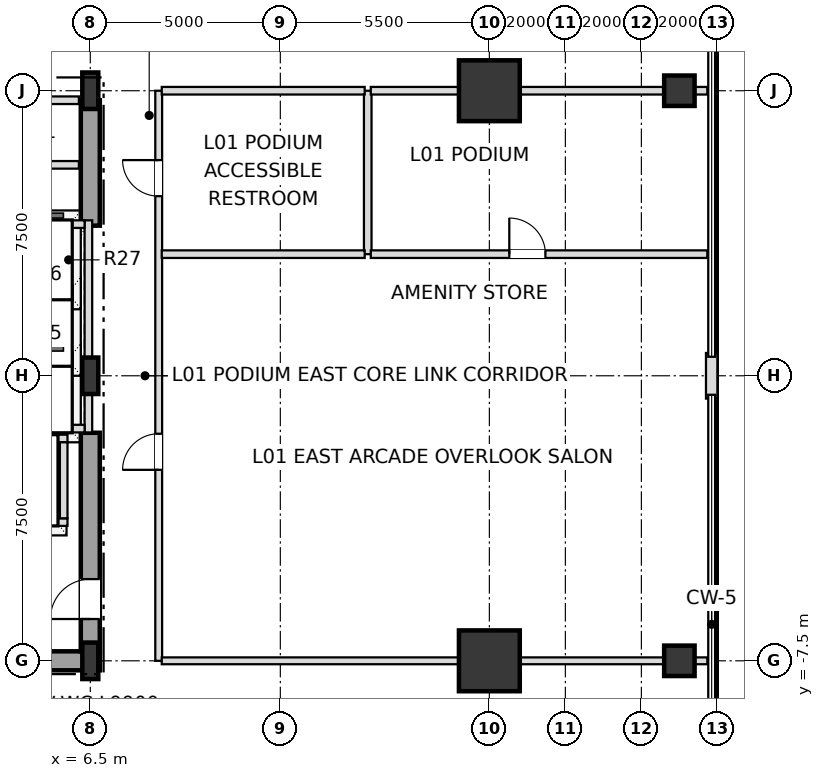
"""IFC4 building model, lengths in metres.
Left out: names, types, materials, properties, quantities, classifications, styles, units other than length and angle.
Written with IfcOpenShell. Run it as: python <this file> out.ifc"""

import sys

from ifc_helpers import new_model, si_unit, direction, frame, frame_2d, origin, origin_2d, place, context, subcontext, project, spatial, rectangle, i_section, extrude, element, fill, save


model = new_model("IFC4")
c1 = context("Model", 3, precision=1e-05, world=origin(), true_north=direction((0.0, 1.0)))
c2 = subcontext(c1, "Body", "Model", "MODEL_VIEW")
j1 = project(units=[si_unit("LENGTHUNIT", "METRE"), si_unit("PLANEANGLEUNIT", "RADIAN")], contexts=[c1])
p1 = place(None, origin())
s1 = spatial("IfcSite", under=j1, at=p1, CompositionType="ELEMENT")
p2 = place(p1, origin())
s2 = spatial("IfcBuilding", under=s1, at=p2, CompositionType="ELEMENT")
p3 = place(p2, frame((0.0, 0.0, 6.0)))
s3 = spatial("IfcBuildingStorey", under=s2, at=p3, CompositionType="ELEMENT", Elevation=6.0)
for number, where, z_axis, x_axis in (
    (1, (6.5, -7.5, 0.0), (0.0, 0.0, 1.0), (1.0, 0.0, 0.0)),
    (2, (6.5, 0.0, 0.0), (0.0, 0.0, 1.0), (1.0, 0.0, 0.0)),
    (3, (6.5, 7.5, 0.0), (0.0, 0.0, 1.0), (1.0, 0.0, 0.0)),
):
    element("IfcColumn", number, at=place(p3, frame(where, z_axis=z_axis, x_axis=x_axis)), inside=s3, PredefinedType="COLUMN", context=c2, shape_type="SweptSolid", body=[
        extrude(i_section(OverallWidth=0.42, OverallDepth=0.96, WebThickness=0.022, FlangeThickness=0.034, at=origin_2d()), origin(), (0.0, 0.0, 1.0), 5.4),
    ])
for number, where, z_axis, x_axis in (
    (4, (17.0, -7.5, 0.0), (0.0, 0.0, 1.0), (1.0, 0.0, 0.0)),
    (5, (17.0, 7.5, 0.0), (0.0, 0.0, 1.0), (1.0, 0.0, 0.0)),
):
    element("IfcColumn", number, at=place(p3, frame(where, z_axis=z_axis, x_axis=x_axis)), inside=s3, PredefinedType="USERDEFINED", context=c2, shape_type="SweptSolid", body=[
        extrude(rectangle(XDim=1.6, YDim=1.6, at=origin_2d()), origin(), (0.0, 0.0, 1.0), 5.4),
    ])
for number, where, z_axis, x_axis in (
    (6, (22.0, -7.5, 0.0), (0.0, 0.0, 1.0), (1.0, 0.0, 0.0)),
    (7, (22.0, 7.5, 0.0), (0.0, 0.0, 1.0), (1.0, 0.0, 0.0)),
):
    element("IfcColumn", number, at=place(p3, frame(where, z_axis=z_axis, x_axis=x_axis)), inside=s3, PredefinedType="COLUMN", context=c2, shape_type="SweptSolid", body=[
        extrude(rectangle(XDim=0.8, YDim=0.8, at=origin_2d()), origin(), (0.0, 0.0, 1.0), 5.4),
    ])
p4 = place(p3, frame((22.85, -0.6, 0.0), z_axis=(0.0, 0.0, 1.0), x_axis=(0.0, 1.0, 0.0)))
e8 = element("IfcWall", 8, at=p4, inside=s3, PredefinedType="SOLIDWALL", context=c2, shape_type="SweptSolid", body=[
    extrude(rectangle(XDim=1.2, YDim=0.3, at=frame_2d((0.6, 0.0))), origin(), (0.0, 0.0, 1.0), 4.476),
])
p5 = place(p3, frame((0.0, -7.5, 0.0), z_axis=(0.0, 0.0, 1.0), x_axis=(1.0, 0.0, 0.0)))
e9 = element("IfcWall", 9, at=p5, inside=s3, PredefinedType="SHEAR", context=c2, shape_type="SweptSolid", body=[
    extrude(rectangle(XDim=6.75, YDim=0.5, at=frame_2d((3.375, 0.0))), origin(), (0.0, 0.0, 1.0), 5.12),
])
p6 = place(p3, frame((6.5, -7.25, 0.0), z_axis=(0.0, 0.0, 1.0), x_axis=(0.0, 1.0, 0.0)))
e10 = element("IfcWall", 10, at=p6, inside=s3, PredefinedType="SHEAR", context=c2, shape_type="SweptSolid", body=[
    extrude(rectangle(XDim=5.75, YDim=0.5, at=frame_2d((2.875, 0.0))), origin(), (0.0, 0.0, 1.0), 5.12),
])
p7 = place(p6, frame((0.85, 0.0, 0.0)))
e11 = element("IfcOpeningElement", 11, at=p7, cuts=e10, PredefinedType="OPENING", context=c2, shape_type="SweptSolid", body=[
    extrude(rectangle(XDim=1.05, YDim=2.15, at=frame_2d((0.525, 1.075))), frame((0.0, 0.26, 0.0), z_axis=(0.0, -1.0, 0.0), x_axis=(1.0, 0.0, 0.0)), (0.0, 0.0, 1.0), 0.52),
])
p8 = place(p3, frame((6.5, 3.95, 0.0), z_axis=(0.0, 0.0, 1.0), x_axis=(0.0, 1.0, 0.0)))
e12 = element("IfcWall", 12, at=p8, inside=s3, PredefinedType="SHEAR", context=c2, shape_type="SweptSolid", body=[
    extrude(rectangle(XDim=3.3, YDim=0.5, at=frame_2d((1.65, 0.0))), origin(), (0.0, 0.0, 1.0), 5.12),
])
p9 = place(p3, frame((6.45, -1.49, 0.0), z_axis=(0.0, 0.0, 1.0), x_axis=(0.0, 1.0, 0.0)))
e13 = element("IfcWall", 13, at=p9, inside=s3, PredefinedType="SOLIDWALL", context=c2, shape_type="SweptSolid", body=[
    extrude(rectangle(XDim=5.58, YDim=0.2, at=frame_2d((2.79, 0.0))), origin(), (0.0, 0.0, 1.0), 4.41),
])
for number, where, z_axis, x_axis in (
    (14, (4.15, -1.39, 0.0), (0.0, 0.0, 1.0), (1.0, 0.0, 0.0)),
    (15, (4.15, 3.99, 0.0), (0.0, 0.0, 1.0), (1.0, 0.0, 0.0)),
):
    element("IfcWall", number, at=place(p3, frame(where, z_axis=z_axis, x_axis=x_axis)), inside=s3, PredefinedType="SOLIDWALL", context=c2, shape_type="SweptSolid", body=[
        extrude(rectangle(XDim=2.2, YDim=0.2, at=frame_2d((1.1, 0.0))), origin(), (0.0, 0.0, 1.0), 5.12),
    ])
p10 = place(p3, frame((1.8, -3.85, 0.0), z_axis=(0.0, 0.0, 1.0), x_axis=(1.0, 0.0, 0.0)))
e16 = element("IfcWall", 16, at=p10, inside=s3, PredefinedType="SOLIDWALL", context=c2, shape_type="SweptSolid", body=[
    extrude(rectangle(XDim=4.1, YDim=0.2, at=frame_2d((2.05, 0.0))), origin(), (0.0, 0.0, 1.0), 5.12),
])
p11 = place(p10, frame((0.45, 0.0, 0.0)))
e17 = element("IfcOpeningElement", 17, at=p11, cuts=e16, PredefinedType="OPENING", context=c2, shape_type="SweptSolid", body=[
    extrude(rectangle(XDim=1.2, YDim=2.2, at=frame_2d((0.6, 1.1))), frame((0.0, 0.11, 0.0), z_axis=(0.0, -1.0, 0.0), x_axis=(1.0, 0.0, 0.0)), (0.0, 0.0, 1.0), 0.22),
])
p12 = place(p10, frame((2.45, 0.0, 0.0)))
e18 = element("IfcOpeningElement", 18, at=p12, cuts=e16, PredefinedType="OPENING", context=c2, shape_type="SweptSolid", body=[
    extrude(rectangle(XDim=1.2, YDim=2.2, at=frame_2d((0.6, 1.1))), frame((0.0, 0.11, 0.0), z_axis=(0.0, -1.0, 0.0), x_axis=(1.0, 0.0, 0.0)), (0.0, 0.0, 1.0), 0.22),
])
p13 = place(p3, frame((1.8, -1.65, 0.0), z_axis=(0.0, 0.0, 1.0), x_axis=(1.0, 0.0, 0.0)))
e19 = element("IfcWall", 19, at=p13, inside=s3, PredefinedType="SOLIDWALL", context=c2, shape_type="SweptSolid", body=[
    extrude(rectangle(XDim=4.1, YDim=0.2, at=frame_2d((2.05, 0.0))), origin(), (0.0, 0.0, 1.0), 5.12),
])
p14 = place(p3, frame((5.8, -3.75, 0.0), z_axis=(0.0, 0.0, 1.0), x_axis=(0.0, 1.0, 0.0)))
e20 = element("IfcWall", 20, at=p14, inside=s3, PredefinedType="SOLIDWALL", context=c2, shape_type="SweptSolid", body=[
    extrude(rectangle(XDim=2.0, YDim=0.2, at=frame_2d((1.0, 0.0))), origin(), (0.0, 0.0, 1.0), 5.12),
])
p15 = place(p3, frame((8.3, -7.5, 0.0), z_axis=(0.0, 0.0, 1.0), x_axis=(0.0, 1.0, 0.0)))
e21 = element("IfcWall", 21, at=p15, inside=s3, PredefinedType="PARTITIONING", context=c2, shape_type="SweptSolid", body=[
    extrude(rectangle(XDim=15.0, YDim=0.18, at=frame_2d((7.5, 0.0))), origin(), (0.0, 0.0, 1.0), 5.12),
])
p16 = place(p15, frame((5.025, 0.0, 0.0)))
e22 = element("IfcOpeningElement", 22, at=p16, cuts=e21, PredefinedType="OPENING", context=c2, shape_type="SweptSolid", body=[
    extrude(rectangle(XDim=0.95, YDim=2.15, at=frame_2d((0.475, 1.075))), frame((0.0, 0.1, 0.0), z_axis=(0.0, -1.0, 0.0), x_axis=(1.0, 0.0, 0.0)), (0.0, 0.0, 1.0), 0.2),
])
p17 = place(p15, frame((12.225, 0.0, 0.0)))
e23 = element("IfcOpeningElement", 23, at=p17, cuts=e21, PredefinedType="OPENING", context=c2, shape_type="SweptSolid", body=[
    extrude(rectangle(XDim=0.95, YDim=2.15, at=frame_2d((0.475, 1.075))), frame((0.0, 0.1, 0.0), z_axis=(0.0, -1.0, 0.0), x_axis=(1.0, 0.0, 0.0)), (0.0, 0.0, 1.0), 0.2),
])
p18 = place(p3, frame((13.8, 3.2, 0.0), z_axis=(0.0, 0.0, 1.0), x_axis=(0.0, 1.0, 0.0)))
e24 = element("IfcWall", 24, at=p18, inside=s3, PredefinedType="SOLIDWALL", context=c2, shape_type="SweptSolid", body=[
    extrude(rectangle(XDim=4.3, YDim=0.2, at=frame_2d((2.15, 0.0))), origin(), (0.0, 0.0, 1.0), 5.12),
])
p19 = place(p3, frame((8.38, -7.5, 0.0), z_axis=(0.0, 0.0, 1.0), x_axis=(1.0, 0.0, 0.0)))
e25 = element("IfcWall", 25, at=p19, inside=s3, PredefinedType="PARTITIONING", context=c2, shape_type="SweptSolid", body=[
    extrude(rectangle(XDim=14.355, YDim=0.18, at=frame_2d((7.178, 0.0))), origin(), (0.0, 0.0, 1.0), 4.41),
])
p20 = place(p3, frame((8.38, 3.2, 0.0), z_axis=(0.0, 0.0, 1.0), x_axis=(1.0, 0.0, 0.0)))
e26 = element("IfcWall", 26, at=p20, inside=s3, PredefinedType="SOLIDWALL", context=c2, shape_type="SweptSolid", body=[
    extrude(rectangle(XDim=5.34, YDim=0.2, at=frame_2d((2.67, 0.0))), origin(), (0.0, 0.0, 1.0), 4.642),
])
p21 = place(p3, frame((13.88, 3.2, 0.0), z_axis=(0.0, 0.0, 1.0), x_axis=(1.0, 0.0, 0.0)))
e27 = element("IfcWall", 27, at=p21, inside=s3, PredefinedType="SOLIDWALL", context=c2, shape_type="SweptSolid", body=[
    extrude(rectangle(XDim=8.855, YDim=0.2, at=frame_2d((4.428, 0.0))), origin(), (0.0, 0.0, 1.0), 4.41),
])
p22 = place(p21, frame((3.645, 0.0, 0.0)))
e28 = element("IfcOpeningElement", 28, at=p22, cuts=e27, PredefinedType="OPENING", context=c2, shape_type="SweptSolid", body=[
    extrude(rectangle(XDim=0.95, YDim=2.15, at=frame_2d((0.475, 1.075))), frame((0.0, 0.11, 0.0), z_axis=(0.0, -1.0, 0.0), x_axis=(1.0, 0.0, 0.0)), (0.0, 0.0, 1.0), 0.22),
])
p23 = place(p3, frame((4.13, 5.55, 0.0), z_axis=(0.0, 0.0, 1.0), x_axis=(1.0, 0.0, 0.0)))
e29 = element("IfcWall", 29, at=p23, inside=s3, PredefinedType="SOLIDWALL", context=c2, shape_type="SweptSolid", body=[
    extrude(rectangle(XDim=2.07, YDim=0.2, at=frame_2d((1.035, 0.0))), origin(), (0.0, 0.0, 1.0), 5.12),
])
p24 = place(p3, frame((4.13, 7.25, 0.0), z_axis=(0.0, 0.0, 1.0), x_axis=(1.0, 0.0, 0.0)))
e30 = element("IfcWall", 30, at=p24, inside=s3, PredefinedType="SOLIDWALL", context=c2, shape_type="SweptSolid", body=[
    extrude(rectangle(XDim=2.07, YDim=0.2, at=frame_2d((1.035, 0.0))), origin(), (0.0, 0.0, 1.0), 4.41),
])
p25 = place(p3, frame((8.38, 7.5, 0.0), z_axis=(0.0, 0.0, 1.0), x_axis=(1.0, 0.0, 0.0)))
e31 = element("IfcWall", 31, at=p25, inside=s3, PredefinedType="SOLIDWALL", context=c2, shape_type="SweptSolid", body=[
    extrude(rectangle(XDim=5.34, YDim=0.2, at=frame_2d((2.67, 0.0))), origin(), (0.0, 0.0, 1.0), 4.41),
])
p26 = place(p3, frame((13.88, 7.5, 0.0), z_axis=(0.0, 0.0, 1.0), x_axis=(1.0, 0.0, 0.0)))
e32 = element("IfcWall", 32, at=p26, inside=s3, PredefinedType="SOLIDWALL", context=c2, shape_type="SweptSolid", body=[
    extrude(rectangle(XDim=8.855, YDim=0.2, at=frame_2d((4.428, 0.0))), origin(), (0.0, 0.0, 1.0), 4.41),
])
p27 = place(p7, origin())
e33 = element("IfcDoor", 33, at=p27, inside=s3, OperationType="SINGLE_SWING_LEFT", PredefinedType="DOOR", context=c2, shape_type="SweptSolid", body=[
    extrude(rectangle(XDim=1.05, YDim=2.15, at=frame_2d((0.525, 1.075))), frame((0.0, 0.025, 0.0), z_axis=(0.0, -1.0, 0.0), x_axis=(1.0, 0.0, 0.0)), (0.0, 0.0, 1.0), 0.05),
])
fill(e11, e33)
p28 = place(p16, origin())
e34 = element("IfcDoor", 34, at=p28, inside=s3, OperationType="SINGLE_SWING_LEFT", PredefinedType="DOOR", context=c2, shape_type="SweptSolid", body=[
    extrude(rectangle(XDim=0.95, YDim=2.15, at=frame_2d((0.475, 1.075))), frame((0.0, 0.025, 0.0), z_axis=(0.0, -1.0, 0.0), x_axis=(1.0, 0.0, 0.0)), (0.0, 0.0, 1.0), 0.05),
])
fill(e22, e34)
p29 = place(p17, origin())
e35 = element("IfcDoor", 35, at=p29, inside=s3, OperationType="SINGLE_SWING_RIGHT", PredefinedType="DOOR", context=c2, shape_type="SweptSolid", body=[
    extrude(rectangle(XDim=0.95, YDim=2.15, at=frame_2d((0.475, 1.075))), frame((0.0, 0.025, 0.0), z_axis=(0.0, -1.0, 0.0), x_axis=(1.0, 0.0, 0.0)), (0.0, 0.0, 1.0), 0.05),
])
fill(e23, e35)
p30 = place(p22, origin())
e36 = element("IfcDoor", 36, at=p30, inside=s3, OperationType="SINGLE_SWING_LEFT", PredefinedType="DOOR", context=c2, shape_type="SweptSolid", body=[
    extrude(rectangle(XDim=0.95, YDim=2.15, at=frame_2d((0.475, 1.075))), frame((0.0, 0.025, 0.0), z_axis=(0.0, -1.0, 0.0), x_axis=(1.0, 0.0, 0.0)), (0.0, 0.0, 1.0), 0.05),
])
fill(e28, e36)
save(model, sys.argv[1])
